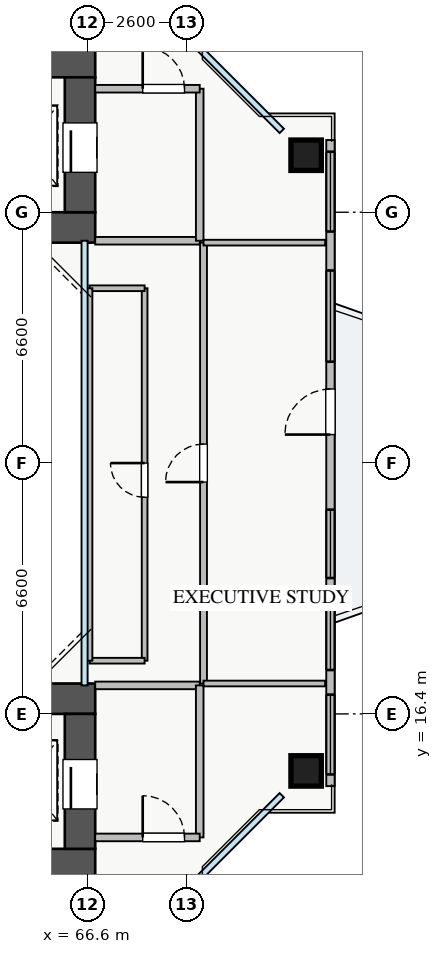
"""IFC4 building model, lengths in metres.
Left out: names, types, materials, properties, quantities, classifications, styles, units other than length and angle.
Written with IfcOpenShell. Run it as: python <this file> out.ifc"""

import sys

from ifc_helpers import new_model, si_unit, direction, frame, frame_2d, origin, origin_2d, place, context, subcontext, project, spatial, rectangle, extrude, source, transform, mapped, element, fill, save


model = new_model("IFC4")
c1 = context("Model", 3, precision=1e-05, world=origin(), true_north=direction((0.0, 1.0)))
c2 = subcontext(c1, "Body", "Model", "MODEL_VIEW")
j1 = project(units=[si_unit("LENGTHUNIT", "METRE"), si_unit("PLANEANGLEUNIT", "RADIAN")], contexts=[c1])
p1 = place(None, origin())
s1 = spatial("IfcSite", under=j1, at=p1, CompositionType="ELEMENT")
p2 = place(p1, origin())
s2 = spatial("IfcBuilding", under=s1, at=p2, CompositionType="ELEMENT")
p3 = place(p2, frame((0.0, 0.0, 103.5)))
s3 = spatial("IfcBuildingStorey", under=s2, at=p3, CompositionType="ELEMENT", Elevation=103.5)
p4 = place(p3, frame((54.2, 29.2, 0.0), z_axis=(0.0, 0.0, 1.0), x_axis=(1.0, 0.0, 0.0)))
e1 = element("IfcWall", 1, at=p4, inside=s3, PredefinedType="SHEAR", context=c2, shape_type="SweptSolid", body=[
    extrude(rectangle(XDim=12.6, YDim=0.8, at=frame_2d((6.3, 0.0))), origin(), (0.0, 0.0, 1.0), 3.25),
])
p5 = place(p3, frame((54.2, 33.55, 0.0), z_axis=(0.0, 0.0, 1.0), x_axis=(1.0, 0.0, 0.0)))
e2 = element("IfcWall", 2, at=p5, inside=s3, PredefinedType="SHEAR", context=c2, shape_type="SweptSolid", body=[
    extrude(rectangle(XDim=12.6, YDim=0.8, at=frame_2d((6.3, 0.0))), origin(), (0.0, 0.0, 1.0), 3.25),
])
p6 = place(p5, frame((8.2, 0.0, 0.0)))
e3 = element("IfcOpeningElement", 3, at=p6, cuts=e2, PredefinedType="OPENING", context=c2, shape_type="SweptSolid", body=[
    extrude(rectangle(XDim=1.1, YDim=2.05, at=frame_2d((0.55, 1.025))), frame((0.0, 0.41, 0.0), z_axis=(0.0, -1.0, 0.0), x_axis=(1.0, 0.0, 0.0)), (0.0, 0.0, 1.0), 0.82),
])
p7 = place(p3, frame((66.4, 29.6, 0.0), z_axis=(0.0, 0.0, 1.0), x_axis=(0.0, 1.0, 0.0)))
e4 = element("IfcWall", 4, at=p7, inside=s3, PredefinedType="SHEAR", context=c2, shape_type="SweptSolid", body=[
    extrude(rectangle(XDim=3.55, YDim=0.8, at=frame_2d((1.775, 0.0))), origin(), (0.0, 0.0, 1.0), 3.25),
])
p8 = place(p7, frame((1.05, 0.0, 0.0)))
e5 = element("IfcOpeningElement", 5, at=p8, cuts=e4, PredefinedType="OPENING", context=c2, shape_type="SweptSolid", body=[
    extrude(rectangle(XDim=1.3, YDim=2.05, at=frame_2d((0.65, 1.025))), frame((0.0, 0.41, 0.0), z_axis=(0.0, -1.0, 0.0), x_axis=(1.0, 0.0, 0.0)), (0.0, 0.0, 1.0), 0.82),
])
p9 = place(p3, frame((54.2, 12.45, 0.0), z_axis=(0.0, 0.0, 1.0), x_axis=(1.0, 0.0, 0.0)))
e6 = element("IfcWall", 6, at=p9, inside=s3, PredefinedType="SHEAR", context=c2, shape_type="SweptSolid", body=[
    extrude(rectangle(XDim=12.6, YDim=0.8, at=frame_2d((6.3, 0.0))), origin(), (0.0, 0.0, 1.0), 3.25),
])
p10 = place(p9, frame((8.2, 0.0, 0.0)))
e7 = element("IfcOpeningElement", 7, at=p10, cuts=e6, PredefinedType="OPENING", context=c2, shape_type="SweptSolid", body=[
    extrude(rectangle(XDim=1.1, YDim=2.05, at=frame_2d((0.55, 1.025))), frame((0.0, 0.41, 0.0), z_axis=(0.0, -1.0, 0.0), x_axis=(1.0, 0.0, 0.0)), (0.0, 0.0, 1.0), 0.82),
])
p11 = place(p3, frame((54.2, 16.8, 0.0), z_axis=(0.0, 0.0, 1.0), x_axis=(1.0, 0.0, 0.0)))
e8 = element("IfcWall", 8, at=p11, inside=s3, PredefinedType="SHEAR", context=c2, shape_type="SweptSolid", body=[
    extrude(rectangle(XDim=12.6, YDim=0.8, at=frame_2d((6.3, 0.0))), origin(), (0.0, 0.0, 1.0), 3.25),
])
p12 = place(p3, frame((66.4, 12.85, 0.0), z_axis=(0.0, 0.0, 1.0), x_axis=(0.0, 1.0, 0.0)))
e9 = element("IfcWall", 9, at=p12, inside=s3, PredefinedType="SHEAR", context=c2, shape_type="SweptSolid", body=[
    extrude(rectangle(XDim=3.55, YDim=0.8, at=frame_2d((1.775, 0.0))), origin(), (0.0, 0.0, 1.0), 3.25),
])
p13 = place(p12, frame((1.05, 0.0, 0.0)))
e10 = element("IfcOpeningElement", 10, at=p13, cuts=e9, PredefinedType="OPENING", context=c2, shape_type="SweptSolid", body=[
    extrude(rectangle(XDim=1.3, YDim=2.05, at=frame_2d((0.65, 1.025))), frame((0.0, 0.41, 0.0), z_axis=(0.0, -1.0, 0.0), x_axis=(1.0, 0.0, 0.0)), (0.0, 0.0, 1.0), 0.82),
])
m1 = source(origin(), c2, "Body", "SweptSolid", [
    extrude(rectangle(XDim=0.8, YDim=0.8, at=origin_2d()), origin(), (0.0, 0.0, 1.0), 3.25),
])
for number, where, z_axis, x_axis in (
    (11, (72.35, 14.9, 0.0), (0.0, 0.0, 1.0), (1.0, 0.0, 0.0)),
    (12, (72.35, 31.1, 0.0), (0.0, 0.0, 1.0), (1.0, 0.0, 0.0)),
):
    element("IfcColumn", number, at=place(p3, frame(where, z_axis=z_axis, x_axis=x_axis)), inside=s3, PredefinedType="COLUMN", context=c2, shape_type="MappedRepresentation", body=[
        mapped(m1, transform((0.0, 0.0, 0.0), x_axis=(1.0, 0.0, 0.0), y_axis=(0.0, 1.0, 0.0), z_axis=(0.0, 0.0, 1.0), scale=1.0)),
    ])
p14 = place(p3, frame((72.99, 14.5, 0.0), z_axis=(0.0, 0.0, 1.0), x_axis=(0.0, 1.0, 0.0)))
e13 = element("IfcWall", 13, at=p14, inside=s3, PredefinedType="STANDARD", context=c2, shape_type="SweptSolid", body=[
    extrude(rectangle(XDim=17.0, YDim=0.22, at=frame_2d((8.5, 0.0))), origin(), (0.0, 0.0, 1.0), 2.61),
])
p15 = place(p14, frame((9.25, 0.0, 0.0)))
e14 = element("IfcOpeningElement", 14, at=p15, cuts=e13, PredefinedType="OPENING", context=c2, shape_type="SweptSolid", body=[
    extrude(rectangle(XDim=1.2, YDim=2.1, at=frame_2d((0.6, 1.05))), frame((0.0, 0.12, 0.0), z_axis=(0.0, -1.0, 0.0), x_axis=(1.0, 0.0, 0.0)), (0.0, 0.0, 1.0), 0.24),
])
p16 = place(p14, frame((0.308, 0.0, 0.9)))
e15 = element("IfcOpeningElement", 15, at=p16, cuts=e13, PredefinedType="OPENING", context=c2, shape_type="SweptSolid", body=[
    extrude(rectangle(XDim=2.1, YDim=1.5, at=frame_2d((1.05, 0.75))), frame((0.0, 0.12, 0.0), z_axis=(0.0, -1.0, 0.0), x_axis=(1.0, 0.0, 0.0)), (0.0, 0.0, 1.0), 0.24),
])
p17 = place(p14, frame((5.475, 0.0, 0.9)))
e16 = element("IfcOpeningElement", 16, at=p17, cuts=e13, PredefinedType="OPENING", context=c2, shape_type="SweptSolid", body=[
    extrude(rectangle(XDim=1.8, YDim=1.45, at=frame_2d((0.9, 0.725))), frame((0.0, 0.12, 0.0), z_axis=(0.0, -1.0, 0.0), x_axis=(1.0, 0.0, 0.0)), (0.0, 0.0, 1.0), 0.24),
])
p18 = place(p14, frame((14.593, 0.0, 0.9)))
e17 = element("IfcOpeningElement", 17, at=p18, cuts=e13, PredefinedType="OPENING", context=c2, shape_type="SweptSolid", body=[
    extrude(rectangle(XDim=2.1, YDim=1.5, at=frame_2d((1.05, 0.75))), frame((0.0, 0.12, 0.0), z_axis=(0.0, -1.0, 0.0), x_axis=(1.0, 0.0, 0.0)), (0.0, 0.0, 1.0), 0.24),
])
p19 = place(p14, frame((3.055, 0.0, 0.9)))
e18 = element("IfcOpeningElement", 18, at=p19, cuts=e13, PredefinedType="OPENING", context=c2, shape_type="SweptSolid", body=[
    extrude(rectangle(XDim=2.1, YDim=1.5, at=frame_2d((1.05, 0.75))), frame((0.0, 0.12, 0.0), z_axis=(0.0, -1.0, 0.0), x_axis=(1.0, 0.0, 0.0)), (0.0, 0.0, 1.0), 0.24),
])
p20 = place(p14, frame((11.167, 0.0, 0.9)))
e19 = element("IfcOpeningElement", 19, at=p20, cuts=e13, PredefinedType="OPENING", context=c2, shape_type="SweptSolid", body=[
    extrude(rectangle(XDim=2.4, YDim=1.5, at=frame_2d((1.2, 0.75))), frame((0.0, 0.12, 0.0), z_axis=(0.0, -1.0, 0.0), x_axis=(1.0, 0.0, 0.0)), (0.0, 0.0, 1.0), 0.24),
])
p21 = place(p3, frame((66.8, 28.85, 0.0), z_axis=(0.0, 0.0, 1.0), x_axis=(1.0, 0.0, 0.0)))
e20 = element("IfcWall", 20, at=p21, inside=s3, PredefinedType="PARTITIONING", context=c2, shape_type="SweptSolid", body=[
    extrude(rectangle(XDim=2.75, YDim=0.2, at=frame_2d((1.375, 0.0))), origin(), (0.0, 0.0, 1.0), 3.07),
])
p22 = place(p3, frame((69.55, 28.85, 0.0), z_axis=(0.0, 0.0, 1.0), x_axis=(0.0, 1.0, 0.0)))
e21 = element("IfcWall", 21, at=p22, inside=s3, PredefinedType="PARTITIONING", context=c2, shape_type="SweptSolid", body=[
    extrude(rectangle(XDim=4.0, YDim=0.2, at=frame_2d((2.0, 0.0))), origin(), (0.0, 0.0, 1.0), 3.07),
])
p23 = place(p3, frame((66.8, 32.85, 0.0), z_axis=(0.0, 0.0, 1.0), x_axis=(1.0, 0.0, 0.0)))
e22 = element("IfcWall", 22, at=p23, inside=s3, PredefinedType="PARTITIONING", context=c2, shape_type="SweptSolid", body=[
    extrude(rectangle(XDim=2.75, YDim=0.2, at=frame_2d((1.375, 0.0))), origin(), (0.0, 0.0, 1.0), 3.07),
])
p24 = place(p23, frame((1.25, 0.0, 0.0)))
e23 = element("IfcOpeningElement", 23, at=p24, cuts=e22, PredefinedType="OPENING", context=c2, shape_type="SweptSolid", body=[
    extrude(rectangle(XDim=1.1, YDim=2.05, at=frame_2d((0.55, 1.025))), frame((0.0, 0.11, 0.0), z_axis=(0.0, -1.0, 0.0), x_axis=(1.0, 0.0, 0.0)), (0.0, 0.0, 1.0), 0.22),
])
p25 = place(p3, frame((66.8, 17.15, 0.0), z_axis=(0.0, 0.0, 1.0), x_axis=(1.0, 0.0, 0.0)))
e24 = element("IfcWall", 24, at=p25, inside=s3, PredefinedType="PARTITIONING", context=c2, shape_type="SweptSolid", body=[
    extrude(rectangle(XDim=2.75, YDim=0.2, at=frame_2d((1.375, 0.0))), origin(), (0.0, 0.0, 1.0), 3.07),
])
p26 = place(p3, frame((69.55, 13.15, 0.0), z_axis=(0.0, 0.0, 1.0), x_axis=(0.0, 1.0, 0.0)))
e25 = element("IfcWall", 25, at=p26, inside=s3, PredefinedType="PARTITIONING", context=c2, shape_type="SweptSolid", body=[
    extrude(rectangle(XDim=4.0, YDim=0.2, at=frame_2d((2.0, 0.0))), origin(), (0.0, 0.0, 1.0), 3.07),
])
p27 = place(p3, frame((66.8, 13.15, 0.0), z_axis=(0.0, 0.0, 1.0), x_axis=(1.0, 0.0, 0.0)))
e26 = element("IfcWall", 26, at=p27, inside=s3, PredefinedType="PARTITIONING", context=c2, shape_type="SweptSolid", body=[
    extrude(rectangle(XDim=2.75, YDim=0.2, at=frame_2d((1.375, 0.0))), origin(), (0.0, 0.0, 1.0), 3.07),
])
p28 = place(p27, frame((1.25, 0.0, 0.0)))
e27 = element("IfcOpeningElement", 27, at=p28, cuts=e26, PredefinedType="OPENING", context=c2, shape_type="SweptSolid", body=[
    extrude(rectangle(XDim=1.1, YDim=2.05, at=frame_2d((0.55, 1.025))), frame((0.0, 0.11, 0.0), z_axis=(0.0, -1.0, 0.0), x_axis=(1.0, 0.0, 0.0)), (0.0, 0.0, 1.0), 0.22),
])
p29 = place(p3, frame((69.65, 17.2, 0.0), z_axis=(0.0, 0.0, 1.0), x_axis=(0.0, 1.0, 0.0)))
e28 = element("IfcWall", 28, at=p29, inside=s3, PredefinedType="PARTITIONING", context=c2, shape_type="SweptSolid", body=[
    extrude(rectangle(XDim=11.6, YDim=0.18, at=frame_2d((5.8, 0.0))), origin(), (0.0, 0.0, 1.0), 3.07),
])
p30 = place(p29, frame((5.3, 0.0, 0.0)))
e29 = element("IfcOpeningElement", 29, at=p30, cuts=e28, PredefinedType="OPENING", context=c2, shape_type="SweptSolid", body=[
    extrude(rectangle(XDim=1.0, YDim=2.05, at=frame_2d((0.5, 1.025))), frame((0.0, 0.1, 0.0), z_axis=(0.0, -1.0, 0.0), x_axis=(1.0, 0.0, 0.0)), (0.0, 0.0, 1.0), 0.2),
])
for number, where, z_axis, x_axis in (
    (30, (69.65, 17.2, 0.0), (0.0, 0.0, 1.0), (1.0, 0.0, 0.0)),
    (31, (69.65, 28.8, 0.0), (0.0, 0.0, 1.0), (1.0, 0.0, 0.0)),
):
    element("IfcWall", number, at=place(p3, frame(where, z_axis=z_axis, x_axis=x_axis)), inside=s3, PredefinedType="PARTITIONING", context=c2, shape_type="SweptSolid", body=[
        extrude(rectangle(XDim=3.2, YDim=0.15, at=frame_2d((1.6, 0.0))), origin(), (0.0, 0.0, 1.0), 3.07),
    ])
p31 = place(p3, frame((68.1, 17.8, 0.0), z_axis=(0.0, 0.0, 1.0), x_axis=(0.0, 1.0, 0.0)))
e32 = element("IfcWall", 32, at=p31, inside=s3, PredefinedType="PARTITIONING", context=c2, shape_type="SweptSolid", body=[
    extrude(rectangle(XDim=9.8, YDim=0.15, at=frame_2d((4.9, 0.0))), origin(), (0.0, 0.0, 1.0), 3.07),
])
p32 = place(p31, frame((4.3, 0.0, 0.0)))
e33 = element("IfcOpeningElement", 33, at=p32, cuts=e32, PredefinedType="OPENING", context=c2, shape_type="SweptSolid", body=[
    extrude(rectangle(XDim=0.9, YDim=2.05, at=frame_2d((0.45, 1.025))), frame((0.0, 0.085, 0.0), z_axis=(0.0, -1.0, 0.0), x_axis=(1.0, 0.0, 0.0)), (0.0, 0.0, 1.0), 0.17),
])
p33 = place(p3, frame((66.65, 27.6, 0.0), z_axis=(0.0, 0.0, 1.0), x_axis=(1.0, 0.0, 0.0)))
e34 = element("IfcWall", 34, at=p33, inside=s3, PredefinedType="PARTITIONING", context=c2, shape_type="SweptSolid", body=[
    extrude(rectangle(XDim=1.45, YDim=0.15, at=frame_2d((0.725, 0.0))), origin(), (0.0, 0.0, 1.0), 2.771),
])
p34 = place(p3, frame((66.65, 17.8, 0.0), z_axis=(0.0, 0.0, 1.0), x_axis=(1.0, 0.0, 0.0)))
e35 = element("IfcWall", 35, at=p34, inside=s3, PredefinedType="PARTITIONING", context=c2, shape_type="SweptSolid", body=[
    extrude(rectangle(XDim=1.45, YDim=0.15, at=frame_2d((0.725, 0.0))), origin(), (0.0, 0.0, 1.0), 3.07),
])
p35 = place(p3, frame((66.65, 17.8, 0.0), z_axis=(0.0, 0.0, 1.0), x_axis=(0.0, 1.0, 0.0)))
e36 = element("IfcWall", 36, at=p35, inside=s3, PredefinedType="PARTITIONING", context=c2, shape_type="SweptSolid", body=[
    extrude(rectangle(XDim=9.8, YDim=0.15, at=frame_2d((4.9, 0.0))), origin(), (0.0, 0.0, 1.0), 2.665),
])
m2 = source(origin(), c2, "Body", "SweptSolid", [
    extrude(rectangle(XDim=1.2, YDim=2.1, at=frame_2d((0.6, 1.05))), frame((0.0, 0.025, 0.0), z_axis=(0.0, -1.0, 0.0), x_axis=(1.0, 0.0, 0.0)), (0.0, 0.0, 1.0), 0.05),
])
p36 = place(p15, origin())
e37 = element("IfcDoor", 37, at=p36, inside=s3, OperationType="SINGLE_SWING_LEFT", PredefinedType="DOOR", context=c2, shape_type="MappedRepresentation", body=[
    mapped(m2, transform((0.0, 0.0, 0.0), x_axis=(1.0, 0.0, 0.0), y_axis=(0.0, 1.0, 0.0), z_axis=(0.0, 0.0, 1.0), scale=1.0)),
])
fill(e14, e37)
m3 = source(origin(), c2, "Body", "SweptSolid", [
    extrude(rectangle(XDim=2.1, YDim=1.5, at=frame_2d((1.05, 0.75))), frame((0.0, 0.03, 0.0), z_axis=(0.0, -1.0, 0.0), x_axis=(1.0, 0.0, 0.0)), (0.0, 0.0, 1.0), 0.06),
])
p37 = place(p16, origin())
e38 = element("IfcWindow", 38, at=p37, inside=s3, PartitioningType="TRIPLE_PANEL_VERTICAL", PredefinedType="WINDOW", context=c2, shape_type="MappedRepresentation", body=[
    mapped(m3, transform((0.0, 0.0, 0.0), x_axis=(1.0, 0.0, 0.0), y_axis=(0.0, 1.0, 0.0), z_axis=(0.0, 0.0, 1.0), scale=1.0)),
])
fill(e15, e38)
m4 = source(origin(), c2, "Body", "SweptSolid", [
    extrude(rectangle(XDim=1.8, YDim=1.45, at=frame_2d((0.9, 0.725))), frame((0.0, 0.03, 0.0), z_axis=(0.0, -1.0, 0.0), x_axis=(1.0, 0.0, 0.0)), (0.0, 0.0, 1.0), 0.06),
])
p38 = place(p17, origin())
e39 = element("IfcWindow", 39, at=p38, inside=s3, PartitioningType="DOUBLE_PANEL_VERTICAL", PredefinedType="WINDOW", context=c2, shape_type="MappedRepresentation", body=[
    mapped(m4, transform((0.0, 0.0, 0.0), x_axis=(1.0, 0.0, 0.0), y_axis=(0.0, 1.0, 0.0), z_axis=(0.0, 0.0, 1.0), scale=1.0)),
])
fill(e16, e39)
p39 = place(p18, origin())
e40 = element("IfcWindow", 40, at=p39, inside=s3, PartitioningType="TRIPLE_PANEL_VERTICAL", PredefinedType="WINDOW", context=c2, shape_type="MappedRepresentation", body=[
    mapped(m3, transform((0.0, 0.0, 0.0), x_axis=(1.0, 0.0, 0.0), y_axis=(0.0, 1.0, 0.0), z_axis=(0.0, 0.0, 1.0), scale=1.0)),
])
fill(e17, e40)
m5 = source(origin(), c2, "Body", "SweptSolid", [
    extrude(rectangle(XDim=1.3, YDim=2.05, at=frame_2d((0.65, 1.025))), frame((0.0, 0.025, 0.0), z_axis=(0.0, -1.0, 0.0), x_axis=(1.0, 0.0, 0.0)), (0.0, 0.0, 1.0), 0.05),
])
p40 = place(p8, origin())
e41 = element("IfcDoor", 41, at=p40, inside=s3, OperationType="SLIDING_TO_LEFT", PredefinedType="DOOR", context=c2, shape_type="MappedRepresentation", body=[
    mapped(m5, transform((0.0, 0.0, 0.0), x_axis=(1.0, 0.0, 0.0), y_axis=(0.0, 1.0, 0.0), z_axis=(0.0, 0.0, 1.0), scale=1.0)),
])
fill(e5, e41)
p41 = place(p13, origin())
e42 = element("IfcDoor", 42, at=p41, inside=s3, OperationType="SLIDING_TO_RIGHT", PredefinedType="DOOR", context=c2, shape_type="MappedRepresentation", body=[
    mapped(m5, transform((0.0, 0.0, 0.0), x_axis=(1.0, 0.0, 0.0), y_axis=(0.0, 1.0, 0.0), z_axis=(0.0, 0.0, 1.0), scale=1.0)),
])
fill(e10, e42)
m6 = source(origin(), c2, "Body", "SweptSolid", [
    extrude(rectangle(XDim=1.1, YDim=2.05, at=frame_2d((0.55, 1.025))), frame((0.0, 0.025, 0.0), z_axis=(0.0, -1.0, 0.0), x_axis=(1.0, 0.0, 0.0)), (0.0, 0.0, 1.0), 0.05),
])
p42 = place(p24, origin())
e43 = element("IfcDoor", 43, at=p42, inside=s3, OperationType="SINGLE_SWING_LEFT", PredefinedType="DOOR", context=c2, shape_type="MappedRepresentation", body=[
    mapped(m6, transform((0.0, 0.0, 0.0), x_axis=(1.0, 0.0, 0.0), y_axis=(0.0, 1.0, 0.0), z_axis=(0.0, 0.0, 1.0), scale=1.0)),
])
fill(e23, e43)
p43 = place(p28, origin())
e44 = element("IfcDoor", 44, at=p43, inside=s3, OperationType="SINGLE_SWING_LEFT", PredefinedType="DOOR", context=c2, shape_type="MappedRepresentation", body=[
    mapped(m6, transform((0.0, 0.0, 0.0), x_axis=(1.0, 0.0, 0.0), y_axis=(0.0, 1.0, 0.0), z_axis=(0.0, 0.0, 1.0), scale=1.0)),
])
fill(e27, e44)
m7 = source(origin(), c2, "Body", "SweptSolid", [
    extrude(rectangle(XDim=1.0, YDim=2.05, at=frame_2d((0.5, 1.025))), frame((0.0, 0.025, 0.0), z_axis=(0.0, -1.0, 0.0), x_axis=(1.0, 0.0, 0.0)), (0.0, 0.0, 1.0), 0.05),
])
p44 = place(p30, origin())
e45 = element("IfcDoor", 45, at=p44, inside=s3, OperationType="SINGLE_SWING_LEFT", PredefinedType="DOOR", context=c2, shape_type="MappedRepresentation", body=[
    mapped(m7, transform((0.0, 0.0, 0.0), x_axis=(1.0, 0.0, 0.0), y_axis=(0.0, 1.0, 0.0), z_axis=(0.0, 0.0, 1.0), scale=1.0)),
])
fill(e29, e45)
m8 = source(origin(), c2, "Body", "SweptSolid", [
    extrude(rectangle(XDim=0.9, YDim=2.05, at=frame_2d((0.45, 1.025))), frame((0.0, 0.025, 0.0), z_axis=(0.0, -1.0, 0.0), x_axis=(1.0, 0.0, 0.0)), (0.0, 0.0, 1.0), 0.05),
])
p45 = place(p32, origin())
e46 = element("IfcDoor", 46, at=p45, inside=s3, OperationType="SINGLE_SWING_RIGHT", PredefinedType="DOOR", context=c2, shape_type="MappedRepresentation", body=[
    mapped(m8, transform((0.0, 0.0, 0.0), x_axis=(1.0, 0.0, 0.0), y_axis=(0.0, 1.0, 0.0), z_axis=(0.0, 0.0, 1.0), scale=1.0)),
])
fill(e33, e46)
p46 = place(p19, origin())
e47 = element("IfcWindow", 47, at=p46, inside=s3, PartitioningType="TRIPLE_PANEL_VERTICAL", PredefinedType="WINDOW", context=c2, shape_type="MappedRepresentation", body=[
    mapped(m3, transform((0.0, 0.0, 0.0), x_axis=(1.0, 0.0, 0.0), y_axis=(0.0, 1.0, 0.0), z_axis=(0.0, 0.0, 1.0), scale=1.0)),
])
fill(e18, e47)
m9 = source(origin(), c2, "Body", "SweptSolid", [
    extrude(rectangle(XDim=2.4, YDim=1.5, at=frame_2d((1.2, 0.75))), frame((0.0, 0.03, 0.0), z_axis=(0.0, -1.0, 0.0), x_axis=(1.0, 0.0, 0.0)), (0.0, 0.0, 1.0), 0.06),
])
p47 = place(p20, origin())
e48 = element("IfcWindow", 48, at=p47, inside=s3, PartitioningType="TRIPLE_PANEL_VERTICAL", PredefinedType="WINDOW", context=c2, shape_type="MappedRepresentation", body=[
    mapped(m9, transform((0.0, 0.0, 0.0), x_axis=(1.0, 0.0, 0.0), y_axis=(0.0, 1.0, 0.0), z_axis=(0.0, 0.0, 1.0), scale=1.0)),
])
fill(e19, e48)
save(model, sys.argv[1])
